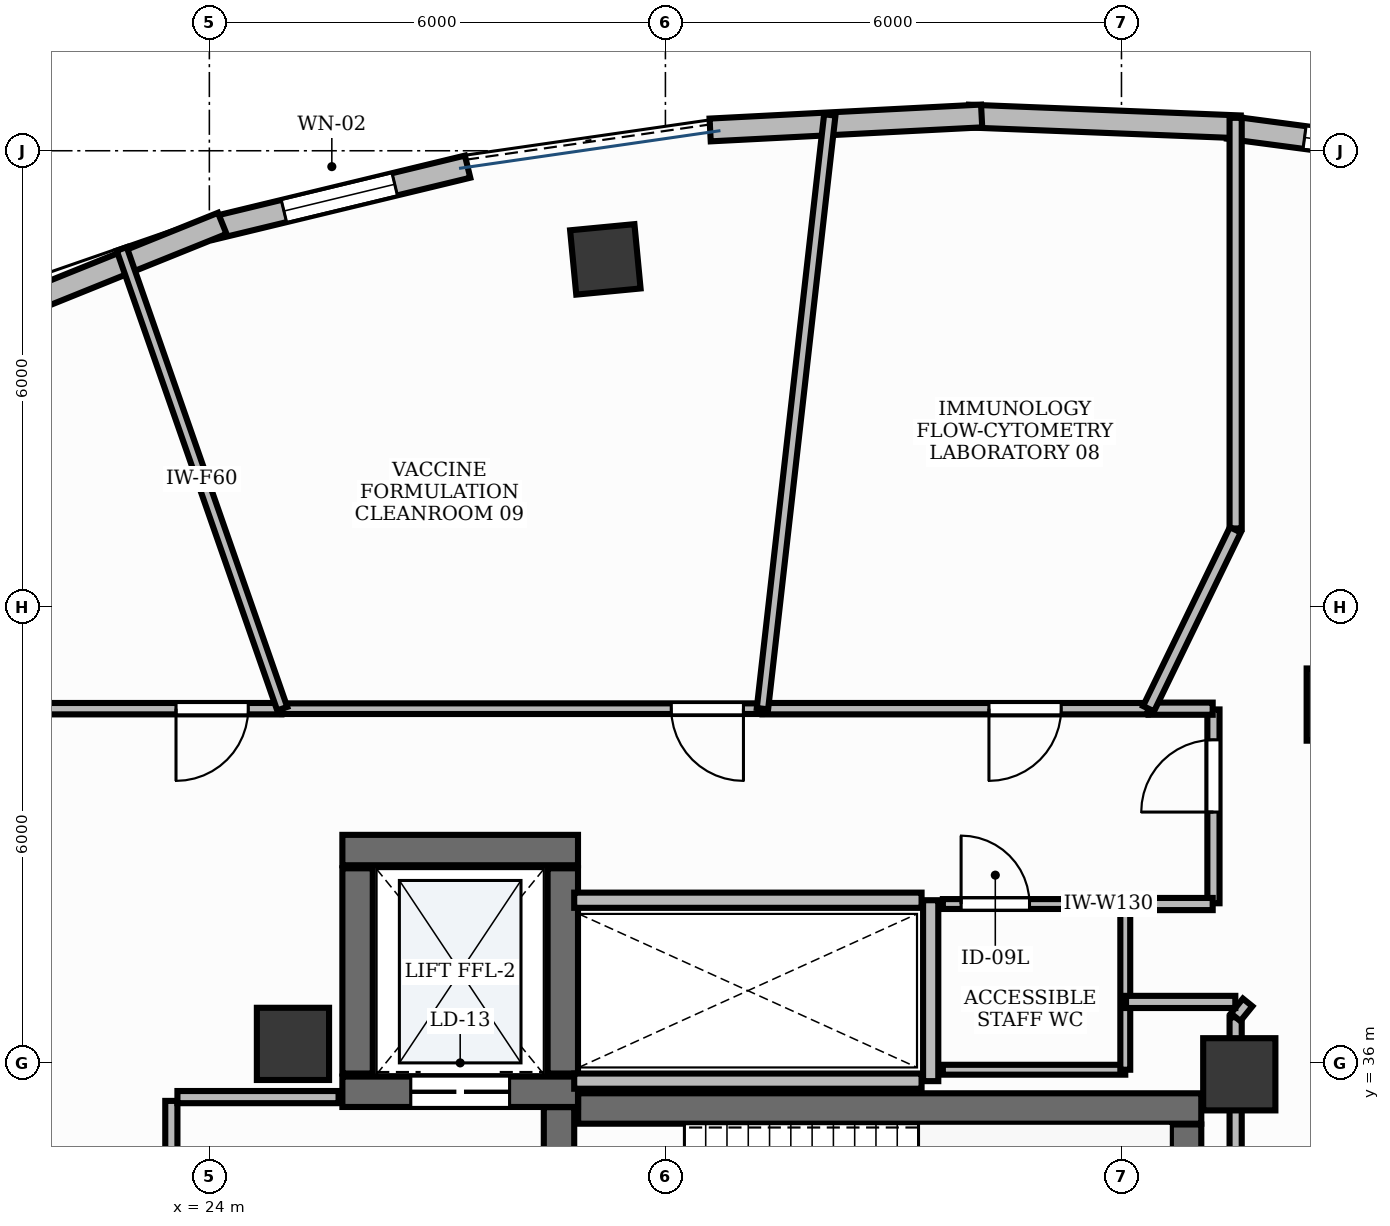
"""IFC4 building model, lengths in metres.
Left out: names, types, materials, properties, quantities, classifications, styles, units other than length and angle.
Written with IfcOpenShell. Run it as: python <this file> out.ifc"""

import sys

from ifc_helpers import new_model, si_unit, direction, frame, frame_2d, origin, origin_2d, place, context, subcontext, project, spatial, rectangle, extrude, element, fill, save


model = new_model("IFC4")
c1 = context("Model", 3, precision=1e-05, world=origin(), true_north=direction((0.0, 1.0)))
c2 = subcontext(c1, "Body", "Model", "MODEL_VIEW")
j1 = project(units=[si_unit("LENGTHUNIT", "METRE"), si_unit("PLANEANGLEUNIT", "RADIAN")], contexts=[c1])
p1 = place(None, origin())
s1 = spatial("IfcSite", under=j1, at=p1, CompositionType="ELEMENT")
p2 = place(p1, origin())
s2 = spatial("IfcBuilding", under=s1, at=p2, CompositionType="ELEMENT")
p3 = place(p2, frame((0.0, 0.0, 243.6)))
s3 = spatial("IfcBuildingStorey", under=s2, at=p3, CompositionType="ELEMENT", Elevation=243.6)
p4 = place(p3, frame((28.852, 35.4, 0.0), z_axis=(0.0, 0.0, 1.0), x_axis=(1.0, 0.0, 0.0)))
e1 = element("IfcWall", 1, at=p4, inside=s3, PredefinedType="SHEAR", context=c2, shape_type="SweptSolid", body=[
    extrude(rectangle(XDim=8.198, YDim=0.4, at=frame_2d((4.099, 0.0))), origin(), (0.0, 0.0, 1.0), 3.9),
])
p5 = place(p3, frame((36.85, 32.11, 0.0), z_axis=(0.0, 0.0, 1.0), x_axis=(0.0, 1.0, 0.0)))
e2 = element("IfcWall", 2, at=p5, inside=s3, PredefinedType="SHEAR", context=c2, shape_type="SweptSolid", body=[
    extrude(rectangle(XDim=3.08, YDim=0.4, at=frame_2d((1.54, 0.0))), origin(), (0.0, 0.0, 1.0), 3.9),
])
p6 = place(p3, frame((28.6, 32.11, 0.0), z_axis=(0.0, 0.0, 1.0), x_axis=(0.0, 1.0, 0.0)))
e3 = element("IfcWall", 3, at=p6, inside=s3, PredefinedType="SHEAR", context=c2, shape_type="SweptSolid", body=[
    extrude(rectangle(XDim=3.308, YDim=0.4, at=frame_2d((1.654, 0.0))), origin(), (0.0, 0.0, 1.0), 3.9),
])
p7 = place(p6, frame((0.2, 0.0, 0.0)))
e4 = element("IfcOpeningElement", 4, at=p7, cuts=e3, PredefinedType="OPENING", context=c2, shape_type="SweptSolid", body=[
    extrude(rectangle(XDim=1.05, YDim=2.15, at=frame_2d((0.525, 1.075))), frame((0.0, 0.215, 0.0), z_axis=(0.0, -1.0, 0.0), x_axis=(1.0, 0.0, 0.0)), (0.0, 0.0, 1.0), 0.43),
])
p8 = place(p3, frame((25.75, 38.8, 0.0), z_axis=(0.0, 0.0, 1.0), x_axis=(1.0, 0.0, 0.0)))
e5 = element("IfcWall", 5, at=p8, inside=s3, PredefinedType="SHEAR", context=c2, shape_type="SweptSolid", body=[
    extrude(rectangle(XDim=3.1, YDim=0.4, at=frame_2d((1.55, 0.0))), origin(), (0.0, 0.0, 1.0), 3.9),
])
p9 = place(p3, frame((25.75, 35.62, 0.0), z_axis=(0.0, 0.0, 1.0), x_axis=(1.0, 0.0, 0.0)))
e6 = element("IfcWall", 6, at=p9, inside=s3, PredefinedType="SHEAR", context=c2, shape_type="SweptSolid", body=[
    extrude(rectangle(XDim=3.1, YDim=0.4, at=frame_2d((1.55, 0.0))), origin(), (0.0, 0.0, 1.0), 3.9),
])
p10 = place(p9, frame((0.9, 0.0, 0.0)))
e7 = element("IfcOpeningElement", 7, at=p10, cuts=e6, PredefinedType="OPENING", context=c2, shape_type="SweptSolid", body=[
    extrude(rectangle(XDim=1.3, YDim=2.2, at=frame_2d((0.65, 1.1))), frame((0.0, 0.215, 0.0), z_axis=(0.0, -1.0, 0.0), x_axis=(1.0, 0.0, 0.0)), (0.0, 0.0, 1.0), 0.43),
])
for number, where, z_axis, x_axis in (
    (8, (25.95, 35.86, 0.0), (0.0, 0.0, 1.0), (0.0, 1.0, 0.0)),
    (9, (28.65, 35.86, 0.0), (0.0, 0.0, 1.0), (0.0, 1.0, 0.0)),
):
    element("IfcWall", number, at=place(p3, frame(where, z_axis=z_axis, x_axis=x_axis)), inside=s3, PredefinedType="SHEAR", context=c2, shape_type="SweptSolid", body=[
        extrude(rectangle(XDim=2.7, YDim=0.4, at=frame_2d((1.35, 0.0))), origin(), (0.0, 0.0, 1.0), 3.9),
    ])
for number, where, z_axis, x_axis in (
    (10, (37.55, 35.85, -0.0), (0.0, 0.0, 1.0), (1.0, 0.0, 0.0)),
    (11, (25.1, 36.25, -0.0), (0.0, 0.0, 1.0), (1.0, 0.0, 0.0)),
):
    element("IfcColumn", number, at=place(p3, frame(where, z_axis=z_axis, x_axis=x_axis)), inside=s3, PredefinedType="PILASTER", context=c2, shape_type="SweptSolid", body=[
        extrude(rectangle(XDim=0.95, YDim=0.95, at=origin_2d()), origin(), (0.0, 0.0, 1.0), 3.901),
    ])
p11 = place(p3, frame((38.911, 40.714, -0.0), z_axis=(0.0, 0.0, 1.0), x_axis=(1.0, 0.0, 0.0)))
e12 = element("IfcColumn", 12, at=p11, inside=s3, PredefinedType="COLUMN", context=c2, shape_type="SweptSolid", body=[
    extrude(rectangle(XDim=0.95, YDim=0.95, at=origin_2d()), origin(), (0.0, 0.0, 1.0), 3.901),
])
p12 = place(p3, frame((29.21, 46.571, -0.0), z_axis=(0.0, 0.0, 1.0), x_axis=(0.995462868748, 0.095150811579, 0.0)))
e13 = element("IfcColumn", 13, at=p12, inside=s3, PredefinedType="COLUMN", context=c2, shape_type="SweptSolid", body=[
    extrude(rectangle(XDim=0.85, YDim=0.85, at=origin_2d()), origin(), (0.0, 0.0, 1.0), 3.901),
])
p13 = place(p3, frame((40.896, 47.845, 0.0), z_axis=(0.0, 0.0, 1.0), x_axis=(-0.991363126073, 0.131145538481, 0.0)))
e14 = element("IfcWall", 14, at=p13, inside=s3, PredefinedType="STANDARD", context=c2, shape_type="SweptSolid", body=[
    extrude(rectangle(XDim=3.518, YDim=0.3, at=frame_2d((1.759, 0.0))), origin(), (0.0, 0.0, 1.0), 3.47),
])
p14 = place(p13, frame((1.009, 0.0, 0.95)))
e15 = element("IfcOpeningElement", 15, at=p14, cuts=e14, PredefinedType="OPENING", context=c2, shape_type="SweptSolid", body=[
    extrude(rectangle(XDim=1.5, YDim=1.8, at=frame_2d((0.75, 0.9))), frame((0.0, 0.165, 0.0), z_axis=(0.0, -1.0, 0.0), x_axis=(1.0, 0.0, 0.0)), (0.0, 0.0, 1.0), 0.33),
])
p15 = place(p3, frame((27.397, 47.791, 0.0), z_axis=(0.0, 0.0, 1.0), x_axis=(-0.972019132567, -0.23490169417, 0.0)))
e16 = element("IfcWall", 16, at=p15, inside=s3, PredefinedType="STANDARD", context=c2, shape_type="SweptSolid", body=[
    extrude(rectangle(XDim=3.472, YDim=0.3, at=frame_2d((1.736, 0.0))), origin(), (0.0, 0.0, 1.0), 3.9),
])
p16 = place(p15, frame((0.986, 0.0, 0.95)))
e17 = element("IfcOpeningElement", 17, at=p16, cuts=e16, PredefinedType="OPENING", context=c2, shape_type="SweptSolid", body=[
    extrude(rectangle(XDim=1.5, YDim=1.8, at=frame_2d((0.75, 0.9))), frame((0.0, 0.165, 0.0), z_axis=(0.0, -1.0, 0.0), x_axis=(1.0, 0.0, 0.0)), (0.0, 0.0, 1.0), 0.33),
])
p17 = place(p3, frame((37.563, 48.314, 0.0), z_axis=(0.0, 0.0, 1.0), x_axis=(-0.999208461954, 0.039780014567, 0.0)))
e18 = element("IfcWall", 18, at=p17, inside=s3, PredefinedType="STANDARD", context=c2, shape_type="SweptSolid", body=[
    extrude(rectangle(XDim=3.578, YDim=0.3, at=frame_2d((1.789, 0.0))), origin(), (0.0, 0.0, 1.0), 3.9),
])
p18 = place(p3, frame((34.16, 48.458, 0.0), z_axis=(0.0, 0.0, 1.0), x_axis=(-0.998671230657, -0.051534193093, 0.0)))
e19 = element("IfcWall", 19, at=p18, inside=s3, PredefinedType="STANDARD", context=c2, shape_type="SweptSolid", body=[
    extrude(rectangle(XDim=3.577, YDim=0.3, at=frame_2d((1.788, 0.0))), origin(), (0.0, 0.0, 1.0), 3.47),
])
p19 = place(p3, frame((24.17, 47.045, 0.0), z_axis=(0.0, 0.0, 1.0), x_axis=(-0.927372969182, -0.374138177725, 0.0)))
e20 = element("IfcWall", 20, at=p19, inside=s3, PredefinedType="STANDARD", context=c2, shape_type="SweptSolid", body=[
    extrude(rectangle(XDim=6.66, YDim=0.3, at=frame_2d((3.33, 0.0))), origin(), (0.0, 0.0, 1.0), 3.9),
])
p20 = place(p3, frame((33.49, 35.76, 0.0), z_axis=(0.0, 0.0, 1.0), x_axis=(0.0, 1.0, 0.0)))
e21 = element("IfcWall", 21, at=p20, inside=s3, PredefinedType="PARTITIONING", context=c2, shape_type="SweptSolid", body=[
    extrude(rectangle(XDim=2.38, YDim=0.2, at=frame_2d((1.19, 0.0))), origin(), (0.0, 0.0, 1.0), 2.91),
])
for number, where, z_axis, x_axis in (
    (22, (28.8, 35.76, 0.0), (0.0, 0.0, 1.0), (1.0, 0.0, 0.0)),
    (23, (28.8, 38.14, 0.0), (0.0, 0.0, 1.0), (1.0, 0.0, 0.0)),
):
    element("IfcWall", number, at=place(p3, frame(where, z_axis=z_axis, x_axis=x_axis)), inside=s3, PredefinedType="PARTITIONING", context=c2, shape_type="SweptSolid", body=[
        extrude(rectangle(XDim=4.57, YDim=0.2, at=frame_2d((2.285, 0.0))), origin(), (0.0, 0.0, 1.0), 2.91),
    ])
p21 = place(p3, frame((23.5, 32.1, 0.0), z_axis=(0.0, 0.0, 1.0), x_axis=(0.0, 1.0, 0.0)))
e24 = element("IfcWall", 24, at=p21, inside=s3, PredefinedType="PARTITIONING", context=c2, shape_type="SweptSolid", body=[
    extrude(rectangle(XDim=3.4, YDim=0.16, at=frame_2d((1.7, 0.0))), origin(), (0.0, 0.0, 1.0), 2.91),
])
p22 = place(p21, frame((1.175, 0.0, 0.0)))
e25 = element("IfcOpeningElement", 25, at=p22, cuts=e24, PredefinedType="OPENING", context=c2, shape_type="SweptSolid", body=[
    extrude(rectangle(XDim=1.05, YDim=2.15, at=frame_2d((0.525, 1.075))), frame((0.0, 0.095, 0.0), z_axis=(0.0, -1.0, 0.0), x_axis=(1.0, 0.0, 0.0)), (0.0, 0.0, 1.0), 0.19),
])
p23 = place(p3, frame((23.58, 35.55, 0.0), z_axis=(0.0, 0.0, 1.0), x_axis=(1.0, 0.0, 0.0)))
e26 = element("IfcWall", 26, at=p23, inside=s3, PredefinedType="PARTITIONING", context=c2, shape_type="SweptSolid", body=[
    extrude(rectangle(XDim=2.12, YDim=0.16, at=frame_2d((1.06, 0.0))), origin(), (0.0, 0.0, 1.0), 2.91),
])
p24 = place(p3, frame((33.65, 38.09, 0.0), z_axis=(0.0, 0.0, 1.0), x_axis=(1.0, 0.0, 0.0)))
e27 = element("IfcWall", 27, at=p24, inside=s3, PredefinedType="PARTITIONING", context=c2, shape_type="SweptSolid", body=[
    extrude(rectangle(XDim=2.4, YDim=0.13, at=frame_2d((1.2, 0.0))), origin(), (0.0, 0.0, 1.0), 2.91),
])
p25 = place(p24, frame((0.24, 0.0, 0.0)))
e28 = element("IfcOpeningElement", 28, at=p25, cuts=e27, PredefinedType="OPENING", context=c2, shape_type="SweptSolid", body=[
    extrude(rectangle(XDim=0.9, YDim=2.15, at=frame_2d((0.45, 1.075))), frame((0.0, 0.08, 0.0), z_axis=(0.0, -1.0, 0.0), x_axis=(1.0, 0.0, 0.0)), (0.0, 0.0, 1.0), 0.16),
])
p26 = place(p3, frame((37.21, 38.1, 0.0), z_axis=(0.0, 0.0, 1.0), x_axis=(0.0, 1.0, 0.0)))
e29 = element("IfcWall", 29, at=p26, inside=s3, PredefinedType="PARTITIONING", context=c2, shape_type="SweptSolid", body=[
    extrude(rectangle(XDim=2.55, YDim=0.16, at=frame_2d((1.275, 0.0))), origin(), (0.0, 0.0, 1.0), 2.91),
])
p27 = place(p26, frame((1.2, 0.0, 0.0)))
e30 = element("IfcOpeningElement", 30, at=p27, cuts=e29, PredefinedType="OPENING", context=c2, shape_type="SweptSolid", body=[
    extrude(rectangle(XDim=0.95, YDim=2.15, at=frame_2d((0.475, 1.075))), frame((0.0, 0.095, 0.0), z_axis=(0.0, -1.0, 0.0), x_axis=(1.0, 0.0, 0.0)), (0.0, 0.0, 1.0), 0.19),
])
p28 = place(p3, frame((36.346, 40.66, 0.0), z_axis=(0.0, 0.0, 1.0), x_axis=(-1.0, 0.0, 0.0)))
e31 = element("IfcWall", 31, at=p28, inside=s3, PredefinedType="PARTITIONING", context=c2, shape_type="SweptSolid", body=[
    extrude(rectangle(XDim=5.07, YDim=0.15, at=frame_2d((2.535, 0.0))), origin(), (0.0, 0.0, 1.0), 2.91),
])
p29 = place(p28, frame((1.14, 0.0, 0.0)))
e32 = element("IfcOpeningElement", 32, at=p29, cuts=e31, PredefinedType="OPENING", context=c2, shape_type="SweptSolid", body=[
    extrude(rectangle(XDim=0.95, YDim=2.15, at=frame_2d((0.475, 1.075))), frame((0.0, 0.09, 0.0), z_axis=(0.0, -1.0, 0.0), x_axis=(1.0, 0.0, 0.0)), (0.0, 0.0, 1.0), 0.18),
])
p30 = place(p3, frame((31.267, 40.66, 0.0), z_axis=(0.0, 0.0, 1.0), x_axis=(-1.0, 0.0, 0.0)))
e33 = element("IfcWall", 33, at=p30, inside=s3, PredefinedType="PARTITIONING", context=c2, shape_type="SweptSolid", body=[
    extrude(rectangle(XDim=6.308, YDim=0.14, at=frame_2d((3.154, 0.0))), origin(), (0.0, 0.0, 1.0), 2.91),
])
p31 = place(p30, frame((0.24, 0.0, 0.0)))
e34 = element("IfcOpeningElement", 34, at=p31, cuts=e33, PredefinedType="OPENING", context=c2, shape_type="SweptSolid", body=[
    extrude(rectangle(XDim=0.95, YDim=2.15, at=frame_2d((0.475, 1.075))), frame((0.0, 0.085, 0.0), z_axis=(0.0, -1.0, 0.0), x_axis=(1.0, 0.0, 0.0)), (0.0, 0.0, 1.0), 0.17),
])
p32 = place(p3, frame((24.948, 40.66, 0.0), z_axis=(0.0, 0.0, 1.0), x_axis=(-1.0, 0.0, 0.0)))
e35 = element("IfcWall", 35, at=p32, inside=s3, PredefinedType="PARTITIONING", context=c2, shape_type="SweptSolid", body=[
    extrude(rectangle(XDim=3.198, YDim=0.15, at=frame_2d((1.599, 0.0))), origin(), (0.0, 0.0, 1.0), 2.91),
])
p33 = place(p32, frame((0.437, 0.0, 0.0)))
e36 = element("IfcOpeningElement", 36, at=p33, cuts=e35, PredefinedType="OPENING", context=c2, shape_type="SweptSolid", body=[
    extrude(rectangle(XDim=0.95, YDim=2.15, at=frame_2d((0.475, 1.075))), frame((0.0, 0.09, 0.0), z_axis=(0.0, -1.0, 0.0), x_axis=(1.0, 0.0, 0.0)), (0.0, 0.0, 1.0), 0.18),
])
p34 = place(p3, frame((36.05, 35.91, 0.0), z_axis=(0.0, 0.0, 1.0), x_axis=(-1.0, 0.0, 0.0)))
e37 = element("IfcWall", 37, at=p34, inside=s3, PredefinedType="PARTITIONING", context=c2, shape_type="SweptSolid", body=[
    extrude(rectangle(XDim=2.4, YDim=0.13, at=frame_2d((1.2, 0.0))), origin(), (0.0, 0.0, 1.0), 2.91),
])
p35 = place(p3, frame((36.05, 38.09, 0.0), z_axis=(0.0, 0.0, 1.0), x_axis=(0.0, -1.0, 0.0)))
e38 = element("IfcWall", 38, at=p35, inside=s3, PredefinedType="PARTITIONING", context=c2, shape_type="SweptSolid", body=[
    extrude(rectangle(XDim=2.18, YDim=0.13, at=frame_2d((1.09, 0.0))), origin(), (0.0, 0.0, 1.0), 2.91),
])
p36 = place(p3, frame((37.502, 43.031, 0.0), z_axis=(0.0, 0.0, 1.0), x_axis=(0.0, 1.0, 0.0)))
e39 = element("IfcWall", 39, at=p36, inside=s3, PredefinedType="PARTITIONING", context=c2, shape_type="SweptSolid", body=[
    extrude(rectangle(XDim=5.403, YDim=0.16, at=frame_2d((2.701, 0.0))), origin(), (0.0, 0.0, 1.0), 2.91),
])
p37 = place(p3, frame((37.502, 30.676, 0.0), z_axis=(0.0, 0.0, 1.0), x_axis=(0.0, 1.0, 0.0)))
e40 = element("IfcWall", 40, at=p37, inside=s3, PredefinedType="PARTITIONING", context=c2, shape_type="SweptSolid", body=[
    extrude(rectangle(XDim=5.924, YDim=0.16, at=frame_2d((2.962, 0.0))), origin(), (0.0, 0.0, 1.0), 2.91),
])
p38 = place(p3, frame((37.502, 36.601, 0.0), z_axis=(0.0, 0.0, 1.0), x_axis=(0.629198228668, 0.777244870707, 0.0)))
e41 = element("IfcWall", 41, at=p38, inside=s3, PredefinedType="PARTITIONING", context=c2, shape_type="SweptSolid", body=[
    extrude(rectangle(XDim=0.251, YDim=0.16, at=frame_2d((0.125, 0.0))), origin(), (0.0, 0.0, 1.0), 2.91),
])
p39 = place(p3, frame((37.498, 36.802, 0.0), z_axis=(0.0, 0.0, 1.0), x_axis=(-1.0, 0.0, 0.0)))
e42 = element("IfcWall", 42, at=p39, inside=s3, PredefinedType="PARTITIONING", context=c2, shape_type="SweptSolid", body=[
    extrude(rectangle(XDim=1.438, YDim=0.16, at=frame_2d((0.719, 0.0))), origin(), (0.0, 0.0, 1.0), 2.91),
])
p40 = place(p3, frame((36.06, 38.09, 0.0), z_axis=(0.0, 0.0, 1.0), x_axis=(1.0, 0.0, 0.0)))
e43 = element("IfcWall", 43, at=p40, inside=s3, PredefinedType="PARTITIONING", context=c2, shape_type="SweptSolid", body=[
    extrude(rectangle(XDim=1.14, YDim=0.16, at=frame_2d((0.57, 0.0))), origin(), (0.0, 0.0, 1.0), 2.91),
])
p41 = place(p3, frame((37.2, 40.66, 0.0), z_axis=(0.0, 0.0, 1.0), x_axis=(-1.0, 0.0, 0.0)))
e44 = element("IfcWall", 44, at=p41, inside=s3, PredefinedType="PARTITIONING", context=c2, shape_type="SweptSolid", body=[
    extrude(rectangle(XDim=0.844, YDim=0.16, at=frame_2d((0.422, 0.0))), origin(), (0.0, 0.0, 1.0), 2.91),
])
p42 = place(p3, frame((36.356, 40.66, 0.0), z_axis=(0.0, 0.0, 1.0), x_axis=(0.436465870706, 0.899720814314, 0.0)))
e45 = element("IfcWall", 45, at=p42, inside=s3, PredefinedType="PARTITIONING", context=c2, shape_type="SweptSolid", body=[
    extrude(rectangle(XDim=2.615, YDim=0.16, at=frame_2d((1.308, 0.0))), origin(), (0.0, 0.0, 1.0), 2.91),
])
p43 = place(p3, frame((31.277, 40.66, 0.0), z_axis=(0.0, 0.0, 1.0), x_axis=(0.112701338023, 0.993628908802, 0.0)))
e46 = element("IfcWall", 46, at=p43, inside=s3, PredefinedType="PARTITIONING", context=c2, shape_type="SweptSolid", body=[
    extrude(rectangle(XDim=7.861, YDim=0.15, at=frame_2d((3.931, 0.0))), origin(), (0.0, 0.0, 1.0), 2.91),
])
p44 = place(p3, frame((24.959, 40.66, 0.0), z_axis=(0.0, 0.0, 1.0), x_axis=(-0.329537269445, 0.944142567649, 0.0)))
e47 = element("IfcWall", 47, at=p44, inside=s3, PredefinedType="PARTITIONING", context=c2, shape_type="SweptSolid", body=[
    extrude(rectangle(XDim=6.407, YDim=0.14, at=frame_2d((3.204, 0.0))), origin(), (0.0, 0.0, 1.0), 2.91),
])
p45 = place(p14, origin())
e48 = element("IfcWindow", 48, at=p45, inside=s3, PartitioningType="DOUBLE_PANEL_VERTICAL", PredefinedType="WINDOW", context=c2, shape_type="SweptSolid", body=[
    extrude(rectangle(XDim=1.5, YDim=1.8, at=frame_2d((0.75, 0.9))), frame((0.0, 0.03, 0.0), z_axis=(0.0, -1.0, 0.0), x_axis=(1.0, 0.0, 0.0)), (0.0, 0.0, 1.0), 0.06),
])
fill(e15, e48)
p46 = place(p16, origin())
e49 = element("IfcWindow", 49, at=p46, inside=s3, PartitioningType="DOUBLE_PANEL_VERTICAL", PredefinedType="WINDOW", context=c2, shape_type="SweptSolid", body=[
    extrude(rectangle(XDim=1.5, YDim=1.8, at=frame_2d((0.75, 0.9))), frame((0.0, 0.03, 0.0), z_axis=(0.0, -1.0, 0.0), x_axis=(1.0, 0.0, 0.0)), (0.0, 0.0, 1.0), 0.06),
])
fill(e17, e49)
p47 = place(p10, origin())
e50 = element("IfcDoor", 50, at=p47, inside=s3, OperationType="DOUBLE_DOOR_SLIDING", PredefinedType="DOOR", context=c2, shape_type="SweptSolid", body=[
    extrude(rectangle(XDim=1.3, YDim=2.2, at=frame_2d((0.65, 1.1))), frame((0.0, 0.025, 0.0), z_axis=(0.0, -1.0, 0.0), x_axis=(1.0, 0.0, 0.0)), (0.0, 0.0, 1.0), 0.05),
])
fill(e7, e50)
p48 = place(p25, origin())
e51 = element("IfcDoor", 51, at=p48, inside=s3, OperationType="SINGLE_SWING_LEFT", PredefinedType="DOOR", context=c2, shape_type="SweptSolid", body=[
    extrude(rectangle(XDim=0.9, YDim=2.15, at=frame_2d((0.45, 1.075))), frame((0.0, 0.025, 0.0), z_axis=(0.0, -1.0, 0.0), x_axis=(1.0, 0.0, 0.0)), (0.0, 0.0, 1.0), 0.05),
])
fill(e28, e51)
p49 = place(p27, origin())
e52 = element("IfcDoor", 52, at=p49, inside=s3, OperationType="SINGLE_SWING_LEFT", PredefinedType="DOOR", context=c2, shape_type="SweptSolid", body=[
    extrude(rectangle(XDim=0.95, YDim=2.15, at=frame_2d((0.475, 1.075))), frame((0.0, 0.025, 0.0), z_axis=(0.0, -1.0, 0.0), x_axis=(1.0, 0.0, 0.0)), (0.0, 0.0, 1.0), 0.05),
])
fill(e30, e52)
p50 = place(p29, origin())
e53 = element("IfcDoor", 53, at=p50, inside=s3, OperationType="SINGLE_SWING_RIGHT", PredefinedType="DOOR", context=c2, shape_type="SweptSolid", body=[
    extrude(rectangle(XDim=0.95, YDim=2.15, at=frame_2d((0.475, 1.075))), frame((0.0, 0.025, 0.0), z_axis=(0.0, -1.0, 0.0), x_axis=(1.0, 0.0, 0.0)), (0.0, 0.0, 1.0), 0.05),
])
fill(e32, e53)
p51 = place(p31, origin())
e54 = element("IfcDoor", 54, at=p51, inside=s3, OperationType="SINGLE_SWING_LEFT", PredefinedType="DOOR", context=c2, shape_type="SweptSolid", body=[
    extrude(rectangle(XDim=0.95, YDim=2.15, at=frame_2d((0.475, 1.075))), frame((0.0, 0.025, 0.0), z_axis=(0.0, -1.0, 0.0), x_axis=(1.0, 0.0, 0.0)), (0.0, 0.0, 1.0), 0.05),
])
fill(e34, e54)
p52 = place(p33, origin())
e55 = element("IfcDoor", 55, at=p52, inside=s3, OperationType="SINGLE_SWING_RIGHT", PredefinedType="DOOR", context=c2, shape_type="SweptSolid", body=[
    extrude(rectangle(XDim=0.95, YDim=2.15, at=frame_2d((0.475, 1.075))), frame((0.0, 0.025, 0.0), z_axis=(0.0, -1.0, 0.0), x_axis=(1.0, 0.0, 0.0)), (0.0, 0.0, 1.0), 0.05),
])
fill(e36, e55)
save(model, sys.argv[1])
